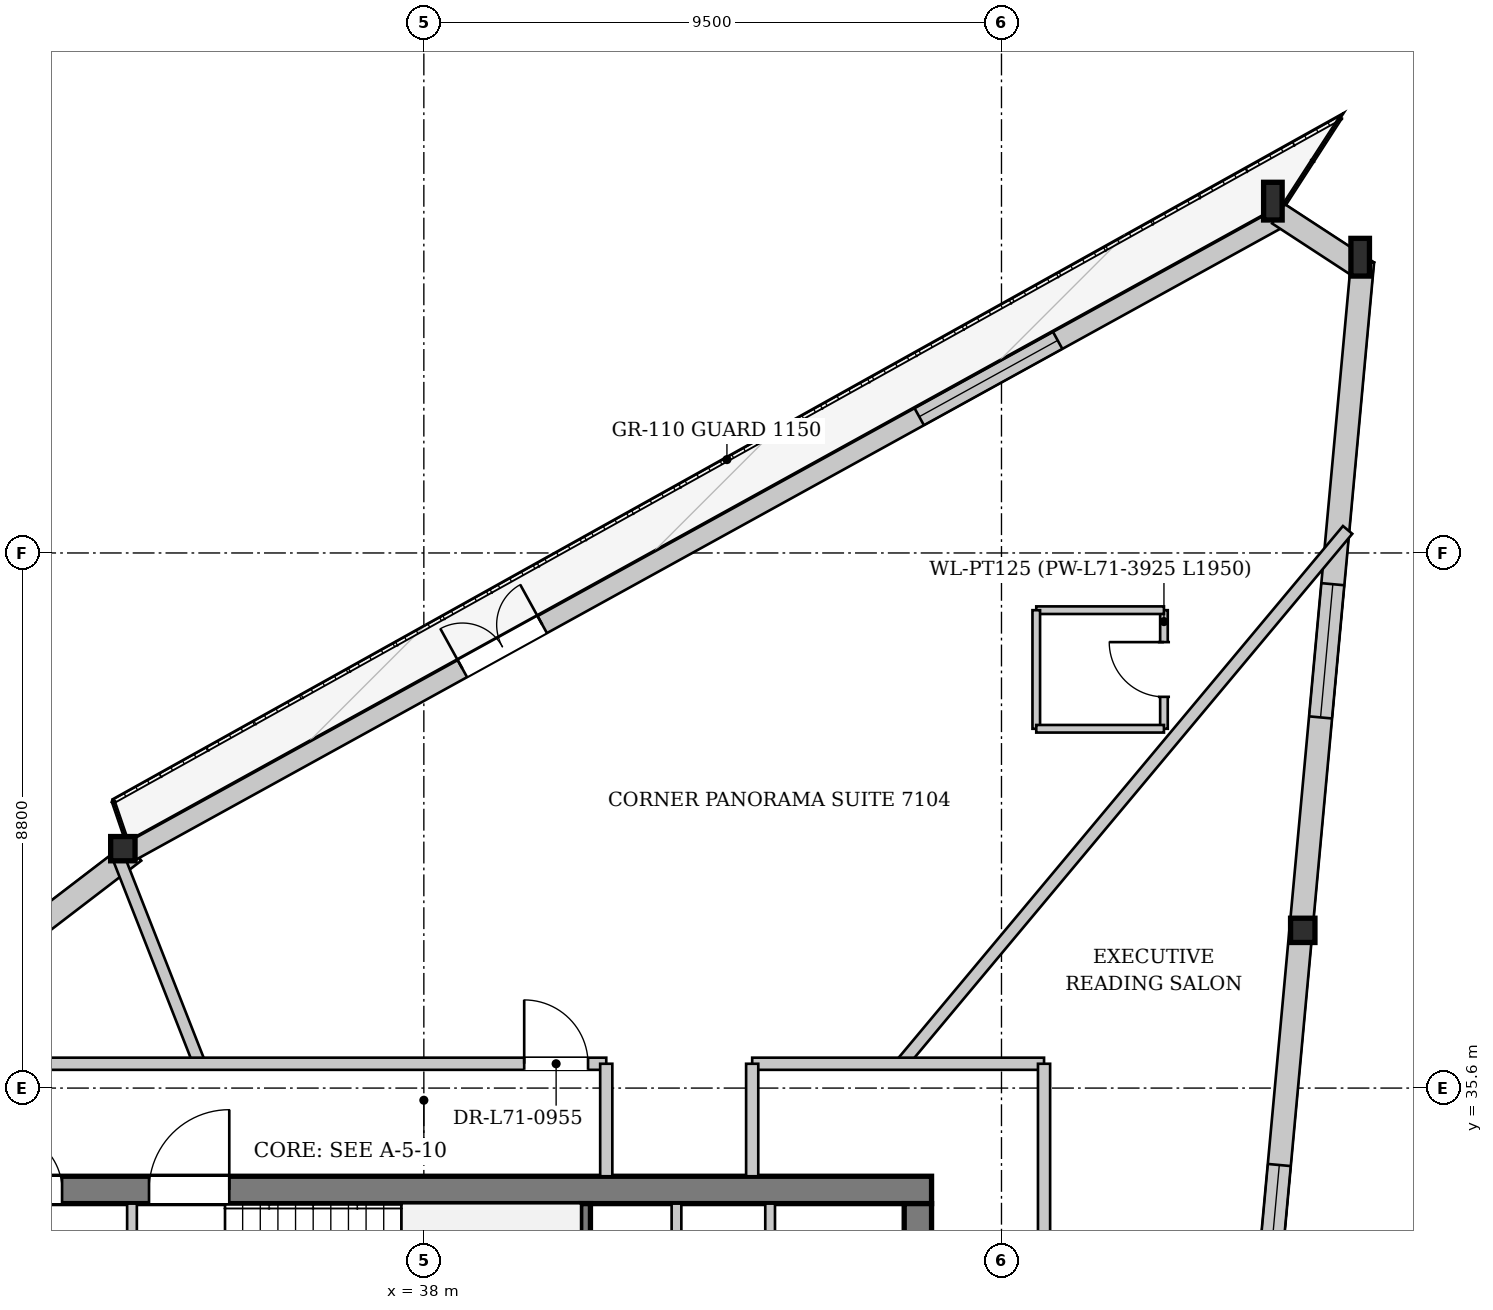
"""IFC4 building model, lengths in metres.
Left out: names, types, materials, properties, quantities, classifications, styles, units other than length and angle.
Written with IfcOpenShell. Run it as: python <this file> out.ifc"""

import sys

from ifc_helpers import new_model, si_unit, direction, frame, frame_2d, origin, origin_2d, place, context, subcontext, project, spatial, rectangle, i_section, extrude, source, transform, mapped, element, fill, save


model = new_model("IFC4")
c1 = context("Model", 3, precision=1e-05, world=origin(), true_north=direction((0.0, 1.0)))
c2 = subcontext(c1, "Body", "Model", "MODEL_VIEW")
j1 = project(units=[si_unit("LENGTHUNIT", "METRE"), si_unit("PLANEANGLEUNIT", "RADIAN")], contexts=[c1])
p1 = place(None, origin())
s1 = spatial("IfcSite", under=j1, at=p1, CompositionType="ELEMENT")
p2 = place(p1, origin())
s2 = spatial("IfcBuilding", under=s1, at=p2, CompositionType="ELEMENT")
p3 = place(p2, frame((0.0, 0.0, 266.9)))
s3 = spatial("IfcBuildingStorey", under=s2, at=p3, CompositionType="ELEMENT", Elevation=266.9)
m1 = source(origin(), c2, "Body", "SweptSolid", [
    extrude(i_section(OverallWidth=0.305, OverallDepth=0.62, WebThickness=0.021, FlangeThickness=0.04, at=origin_2d()), origin(), (0.0, 0.0, 1.0), 3.47),
])
p4 = place(p3, frame((53.628, 49.177, 0.0), z_axis=(-0.131930948894, 0.049746763129, 0.990009840498), x_axis=(-0.352818220088, -0.935691884957, 0.0)))
e1 = element("IfcColumn", 1, at=p4, inside=s3, PredefinedType="COLUMN", context=c2, shape_type="MappedRepresentation", body=[
    mapped(m1, transform((0.0, 0.0, 0.0), x_axis=(1.0, 0.0, 0.0), y_axis=(0.0, 1.0, 0.0), z_axis=(0.0, 0.0, 1.0), scale=1.0)),
])
m2 = source(origin(), c2, "Body", "SweptSolid", [
    extrude(i_section(OverallWidth=0.305, OverallDepth=0.62, WebThickness=0.021, FlangeThickness=0.04, at=origin_2d()), origin(), (0.0, 0.0, 1.0), 3.458),
])
p5 = place(p3, frame((52.158, 50.137, 0.0), z_axis=(-0.112596064897, 0.028025478222, 0.993245537992), x_axis=(-0.241533430749, -0.970392498853, 0.0)))
e2 = element("IfcColumn", 2, at=p5, inside=s3, PredefinedType="COLUMN", context=c2, shape_type="MappedRepresentation", body=[
    mapped(m2, transform((0.0, 0.0, 0.0), x_axis=(1.0, 0.0, 0.0), y_axis=(0.0, 1.0, 0.0), z_axis=(0.0, 0.0, 1.0), scale=1.0)),
])
m3 = source(origin(), c2, "Body", "SweptSolid", [
    extrude(i_section(OverallWidth=0.401, OverallDepth=0.399, WebThickness=0.022, FlangeThickness=0.034, at=origin_2d()), origin(), (0.0, 0.0, 1.0), 3.444),
])
p6 = place(p3, frame((33.122, 39.642, 0.0), z_axis=(-0.041819185738, -0.060673259308, 0.997281259881), x_axis=(0.823367771866, -0.567508160515, 0.0)))
e3 = element("IfcColumn", 3, at=p6, inside=s3, PredefinedType="COLUMN", context=c2, shape_type="MappedRepresentation", body=[
    mapped(m3, transform((0.0, 0.0, 0.0), x_axis=(1.0, 0.0, 0.0), y_axis=(0.0, 1.0, 0.0), z_axis=(0.0, 0.0, 1.0), scale=1.0)),
])
m4 = source(origin(), c2, "Body", "SweptSolid", [
    extrude(i_section(OverallWidth=0.401, OverallDepth=0.399, WebThickness=0.022, FlangeThickness=0.034, at=origin_2d()), origin(), (0.0, 0.0, 1.0), 3.454),
])
p7 = place(p3, frame((52.607, 38.097, 0.0), z_axis=(-0.087933725964, 0.055912843438, 0.994555887709), x_axis=(-0.536568207746, -0.843856953776, 0.0)))
e4 = element("IfcColumn", 4, at=p7, inside=s3, PredefinedType="COLUMN", context=c2, shape_type="MappedRepresentation", body=[
    mapped(m4, transform((0.0, 0.0, 0.0), x_axis=(1.0, 0.0, 0.0), y_axis=(0.0, 1.0, 0.0), z_axis=(0.0, 0.0, 1.0), scale=1.0)),
])
p8 = place(p3, frame((15.976, 26.276, 0.0), z_axis=(0.0, 0.0, 1.0), x_axis=(0.794029694054, 0.607878972297, 0.0)))
e5 = element("IfcWall", 5, at=p8, inside=s3, PredefinedType="SOLIDWALL", context=c2, shape_type="SweptSolid", body=[
    extrude(rectangle(XDim=21.739, YDim=0.38, at=frame_2d((10.869, 0.0))), origin(), (0.0, 0.0, 1.0), 2.872),
])
p9 = place(p8, frame((7.187, 0.0, 0.502)))
e6 = element("IfcOpeningElement", 6, at=p9, cuts=e5, PredefinedType="OPENING", context=c2, shape_type="SweptSolid", body=[
    extrude(rectangle(XDim=2.2, YDim=2.25, at=frame_2d((1.1, 1.125))), frame((0.0, 0.2, 0.0), z_axis=(0.0, -1.0, 0.0), x_axis=(1.0, 0.0, 0.0)), (0.0, 0.0, 1.0), 0.4),
])
p10 = place(p8, frame((16.752, 0.0, 0.502)))
e7 = element("IfcOpeningElement", 7, at=p10, cuts=e5, PredefinedType="OPENING", context=c2, shape_type="SweptSolid", body=[
    extrude(rectangle(XDim=2.2, YDim=2.25, at=frame_2d((1.1, 1.125))), frame((0.0, 0.2, 0.0), z_axis=(0.0, -1.0, 0.0), x_axis=(1.0, 0.0, 0.0)), (0.0, 0.0, 1.0), 0.4),
])
p11 = place(p3, frame((33.199, 39.501, 0.0), z_axis=(0.0, 0.0, 1.0), x_axis=(0.875716063216, 0.482826445658, 0.0)))
e8 = element("IfcWall", 8, at=p11, inside=s3, PredefinedType="SOLIDWALL", context=c2, shape_type="SweptSolid", body=[
    extrude(rectangle(XDim=21.738, YDim=0.32, at=frame_2d((10.869, 0.0))), origin(), (0.0, 0.0, 1.0), 2.872),
])
p12 = place(p11, frame((6.206, 0.0, 0.0)))
e9 = element("IfcOpeningElement", 9, at=p12, cuts=e8, PredefinedType="OPENING", context=c2, shape_type="SweptSolid", body=[
    extrude(rectangle(XDim=1.5, YDim=2.3, at=frame_2d((0.75, 1.15))), frame((0.0, 0.17, 0.0), z_axis=(0.0, -1.0, 0.0), x_axis=(1.0, 0.0, 0.0)), (0.0, 0.0, 1.0), 0.34),
])
p13 = place(p11, frame((14.786, 0.0, 0.402)))
e10 = element("IfcOpeningElement", 10, at=p13, cuts=e8, PredefinedType="OPENING", context=c2, shape_type="SweptSolid", body=[
    extrude(rectangle(XDim=2.6, YDim=2.35, at=frame_2d((1.3, 1.175))), frame((0.0, 0.17, 0.0), z_axis=(0.0, -1.0, 0.0), x_axis=(1.0, 0.0, 0.0)), (0.0, 0.0, 1.0), 0.34),
])
p14 = place(p3, frame((52.054, 49.979, 0.0), z_axis=(0.0, 0.0, 1.0), x_axis=(0.837253617298, -0.54681475869, 0.0)))
e11 = element("IfcWall", 11, at=p14, inside=s3, PredefinedType="SOLIDWALL", context=c2, shape_type="SweptSolid", body=[
    extrude(rectangle(XDim=1.756, YDim=0.38, at=frame_2d((0.878, 0.0))), origin(), (0.0, 0.0, 1.0), 2.872),
])
p15 = place(p3, frame((53.439, 49.195, 0.0), z_axis=(0.0, 0.0, 1.0), x_axis=(-0.091800782473, -0.995777392964, 0.0)))
e12 = element("IfcWall", 12, at=p15, inside=s3, PredefinedType="SOLIDWALL", context=c2, shape_type="SweptSolid", body=[
    extrude(rectangle(XDim=22.254, YDim=0.38, at=frame_2d((11.127, 0.0))), origin(), (0.0, 0.0, 1.0), 2.872),
])
p16 = place(p15, frame((5.331, 0.0, 0.502)))
e13 = element("IfcOpeningElement", 13, at=p16, cuts=e12, PredefinedType="OPENING", context=c2, shape_type="SweptSolid", body=[
    extrude(rectangle(XDim=2.2, YDim=2.25, at=frame_2d((1.1, 1.125))), frame((0.0, 0.2, 0.0), z_axis=(0.0, -1.0, 0.0), x_axis=(1.0, 0.0, 0.0)), (0.0, 0.0, 1.0), 0.4),
])
p17 = place(p15, frame((14.923, 0.0, 0.502)))
e14 = element("IfcOpeningElement", 14, at=p17, cuts=e12, PredefinedType="OPENING", context=c2, shape_type="SweptSolid", body=[
    extrude(rectangle(XDim=2.2, YDim=2.25, at=frame_2d((1.1, 1.125))), frame((0.0, 0.2, 0.0), z_axis=(0.0, -1.0, 0.0), x_axis=(1.0, 0.0, 0.0)), (0.0, 0.0, 1.0), 0.4),
])
p18 = place(p3, frame((29.65, 33.925, 0.0), z_axis=(0.0, 0.0, 1.0), x_axis=(1.0, 0.0, 0.0)))
e15 = element("IfcWall", 15, at=p18, inside=s3, PredefinedType="SHEAR", context=c2, shape_type="SweptSolid", body=[
    extrude(rectangle(XDim=16.7, YDim=0.45, at=frame_2d((8.35, 0.0))), origin(), (0.0, 0.0, 1.0), 3.38),
])
p19 = place(p18, frame((1.45, 0.0, 0.0)))
e16 = element("IfcOpeningElement", 16, at=p19, cuts=e15, PredefinedType="OPENING", context=c2, shape_type="SweptSolid", body=[
    extrude(rectangle(XDim=0.95, YDim=2.1, at=frame_2d((0.475, 1.05))), frame((0.0, 0.235, 0.0), z_axis=(0.0, -1.0, 0.0), x_axis=(1.0, 0.0, 0.0)), (0.0, 0.0, 1.0), 0.47),
])
p20 = place(p18, frame((3.83, 0.0, 0.0)))
e17 = element("IfcOpeningElement", 17, at=p20, cuts=e15, PredefinedType="OPENING", context=c2, shape_type="SweptSolid", body=[
    extrude(rectangle(XDim=1.32, YDim=2.2, at=frame_2d((0.66, 1.1))), frame((0.0, 0.235, 0.0), z_axis=(0.0, -1.0, 0.0), x_axis=(1.0, 0.0, 0.0)), (0.0, 0.0, 1.0), 0.47),
])
p21 = place(p3, frame((46.125, 33.7, 0.0), z_axis=(0.0, 0.0, 1.0), x_axis=(0.0, -1.0, 0.0)))
e18 = element("IfcWall", 18, at=p21, inside=s3, PredefinedType="SHEAR", context=c2, shape_type="SweptSolid", body=[
    extrude(rectangle(XDim=14.2, YDim=0.45, at=frame_2d((7.1, 0.0))), origin(), (0.0, 0.0, 1.0), 3.38),
])
p22 = place(p21, frame((5.18, 0.0, 0.0)))
e19 = element("IfcOpeningElement", 19, at=p22, cuts=e18, PredefinedType="OPENING", context=c2, shape_type="SweptSolid", body=[
    extrude(rectangle(XDim=1.6, YDim=2.2, at=frame_2d((0.8, 1.1))), frame((0.0, 0.235, 0.0), z_axis=(0.0, -1.0, 0.0), x_axis=(1.0, 0.0, 0.0)), (0.0, 0.0, 1.0), 0.47),
])
p23 = place(p21, frame((2.05, 0.0, 0.0)))
e20 = element("IfcOpeningElement", 20, at=p23, cuts=e18, PredefinedType="OPENING", context=c2, shape_type="SweptSolid", body=[
    extrude(rectangle(XDim=0.95, YDim=2.1, at=frame_2d((0.475, 1.05))), frame((0.0, 0.235, 0.0), z_axis=(0.0, -1.0, 0.0), x_axis=(1.0, 0.0, 0.0)), (0.0, 0.0, 1.0), 0.47),
])
p24 = place(p3, frame((40.66, 30.6, 0.0), z_axis=(0.0, 0.0, 1.0), x_axis=(0.0, 1.0, 0.0)))
e21 = element("IfcWall", 21, at=p24, inside=s3, PredefinedType="PARTITIONING", context=c2, shape_type="SweptSolid", body=[
    extrude(rectangle(XDim=3.1, YDim=0.16, at=frame_2d((1.55, 0.0))), origin(), (0.0, 0.0, 1.0), 3.38),
])
p25 = place(p3, frame((33.2, 28.44, 0.0), z_axis=(0.0, 0.0, 1.0), x_axis=(0.0, 1.0, 0.0)))
e22 = element("IfcWall", 22, at=p25, inside=s3, PredefinedType="PARTITIONING", context=c2, shape_type="SweptSolid", body=[
    extrude(rectangle(XDim=5.26, YDim=0.16, at=frame_2d((2.63, 0.0))), origin(), (0.0, 0.0, 1.0), 3.38),
])
p26 = place(p3, frame((42.155, 30.68, 0.0), z_axis=(0.0, 0.0, 1.0), x_axis=(0.0, 1.0, 0.0)))
e23 = element("IfcWall", 23, at=p26, inside=s3, PredefinedType="PARTITIONING", context=c2, shape_type="SweptSolid", body=[
    extrude(rectangle(XDim=3.02, YDim=0.16, at=frame_2d((1.51, 0.0))), origin(), (0.0, 0.0, 1.0), 3.38),
])
p27 = place(p26, frame((0.95, 0.0, 0.0)))
e24 = element("IfcOpeningElement", 24, at=p27, cuts=e23, PredefinedType="OPENING", context=c2, shape_type="SweptSolid", body=[
    extrude(rectangle(XDim=0.95, YDim=2.1, at=frame_2d((0.475, 1.05))), frame((0.0, 0.09, 0.0), z_axis=(0.0, -1.0, 0.0), x_axis=(1.0, 0.0, 0.0)), (0.0, 0.0, 1.0), 0.18),
])
p28 = place(p3, frame((43.695, 30.68, 0.0), z_axis=(0.0, 0.0, 1.0), x_axis=(0.0, 1.0, 0.0)))
e25 = element("IfcWall", 25, at=p28, inside=s3, PredefinedType="PARTITIONING", context=c2, shape_type="SweptSolid", body=[
    extrude(rectangle(XDim=3.02, YDim=0.16, at=frame_2d((1.51, 0.0))), origin(), (0.0, 0.0, 1.0), 3.38),
])
p29 = place(p28, frame((0.95, 0.0, 0.0)))
e26 = element("IfcOpeningElement", 26, at=p29, cuts=e25, PredefinedType="OPENING", context=c2, shape_type="SweptSolid", body=[
    extrude(rectangle(XDim=0.95, YDim=2.1, at=frame_2d((0.475, 1.05))), frame((0.0, 0.09, 0.0), z_axis=(0.0, -1.0, 0.0), x_axis=(1.0, 0.0, 0.0)), (0.0, 0.0, 1.0), 0.18),
])
p30 = place(p3, frame((45.856, 36.0, 0.0), z_axis=(0.0, 0.0, 1.0), x_axis=(0.641258383764, 0.767325019305, 0.0)))
e27 = element("IfcWall", 27, at=p30, inside=s3, PredefinedType="PARTITIONING", context=c2, shape_type="SweptSolid", body=[
    extrude(rectangle(XDim=11.441, YDim=0.2, at=frame_2d((5.721, 0.0))), origin(), (0.0, 0.0, 1.0), 3.38),
])
p31 = place(p3, frame((34.31, 36.0, 0.0), z_axis=(0.0, 0.0, 1.0), x_axis=(-0.365399106967, 0.930850950812, 0.0)))
e28 = element("IfcWall", 28, at=p31, inside=s3, PredefinedType="PARTITIONING", context=c2, shape_type="SweptSolid", body=[
    extrude(rectangle(XDim=3.728, YDim=0.2, at=frame_2d((1.864, 0.0))), origin(), (0.0, 0.0, 1.0), 2.915),
])
p32 = place(p3, frame((50.172, 41.509, 0.0), z_axis=(0.0, 0.0, 1.0), x_axis=(0.0, 1.0, 0.0)))
e29 = element("IfcWall", 29, at=p32, inside=s3, PredefinedType="PARTITIONING", context=c2, shape_type="SweptSolid", body=[
    extrude(rectangle(XDim=1.95, YDim=0.125, at=frame_2d((0.975, 0.0))), origin(), (0.0, 0.0, 1.0), 3.38),
])
p33 = place(p32, frame((0.525, 0.0, 0.0)))
e30 = element("IfcOpeningElement", 30, at=p33, cuts=e29, PredefinedType="OPENING", context=c2, shape_type="SweptSolid", body=[
    extrude(rectangle(XDim=0.9, YDim=2.1, at=frame_2d((0.45, 1.05))), frame((0.0, 0.073, 0.0), z_axis=(0.0, -1.0, 0.0), x_axis=(1.0, 0.0, 0.0)), (0.0, 0.0, 1.0), 0.145),
])
p34 = place(p3, frame((50.172, 43.459, 0.0), z_axis=(0.0, 0.0, 1.0), x_axis=(-1.0, 0.0, 0.0)))
e31 = element("IfcWall", 31, at=p34, inside=s3, PredefinedType="PARTITIONING", context=c2, shape_type="SweptSolid", body=[
    extrude(rectangle(XDim=2.1, YDim=0.125, at=frame_2d((1.05, 0.0))), origin(), (0.0, 0.0, 1.0), 3.38),
])
p35 = place(p3, frame((48.072, 43.459, 0.0), z_axis=(0.0, 0.0, 1.0), x_axis=(0.0, -1.0, 0.0)))
e32 = element("IfcWall", 32, at=p35, inside=s3, PredefinedType="PARTITIONING", context=c2, shape_type="SweptSolid", body=[
    extrude(rectangle(XDim=1.95, YDim=0.125, at=frame_2d((0.975, 0.0))), origin(), (0.0, 0.0, 1.0), 3.055),
])
p36 = place(p3, frame((48.072, 41.509, 0.0), z_axis=(0.0, 0.0, 1.0), x_axis=(1.0, 0.0, 0.0)))
e33 = element("IfcWall", 33, at=p36, inside=s3, PredefinedType="PARTITIONING", context=c2, shape_type="SweptSolid", body=[
    extrude(rectangle(XDim=2.1, YDim=0.125, at=frame_2d((1.05, 0.0))), origin(), (0.0, 0.0, 1.0), 3.38),
])
p37 = place(p3, frame((28.414, 36.0, 0.0), z_axis=(0.0, 0.0, 1.0), x_axis=(1.0, 0.0, 0.0)))
e34 = element("IfcWall", 34, at=p37, inside=s3, PredefinedType="PARTITIONING", context=c2, shape_type="SweptSolid", body=[
    extrude(rectangle(XDim=12.586, YDim=0.2, at=frame_2d((6.293, 0.0))), origin(), (0.0, 0.0, 1.0), 3.38),
])
p38 = place(p37, frame((11.236, 0.0, 0.0)))
e35 = element("IfcOpeningElement", 35, at=p38, cuts=e34, PredefinedType="OPENING", context=c2, shape_type="SweptSolid", body=[
    extrude(rectangle(XDim=1.05, YDim=2.2, at=frame_2d((0.525, 1.1))), frame((0.0, 0.11, 0.0), z_axis=(0.0, -1.0, 0.0), x_axis=(1.0, 0.0, 0.0)), (0.0, 0.0, 1.0), 0.22),
])
p39 = place(p3, frame((41.0, 34.15, 0.0), z_axis=(0.0, 0.0, 1.0), x_axis=(0.0, 1.0, 0.0)))
e36 = element("IfcWall", 36, at=p39, inside=s3, PredefinedType="PARTITIONING", context=c2, shape_type="SweptSolid", body=[
    extrude(rectangle(XDim=1.85, YDim=0.2, at=frame_2d((0.925, 0.0))), origin(), (0.0, 0.0, 1.0), 3.38),
])
p40 = place(p3, frame((43.4, 36.0, 0.0), z_axis=(0.0, 0.0, 1.0), x_axis=(1.0, 0.0, 0.0)))
e37 = element("IfcWall", 37, at=p40, inside=s3, PredefinedType="PARTITIONING", context=c2, shape_type="SweptSolid", body=[
    extrude(rectangle(XDim=4.8, YDim=0.2, at=frame_2d((2.4, 0.0))), origin(), (0.0, 0.0, 1.0), 3.38),
])
p41 = place(p3, frame((43.4, 34.15, 0.0), z_axis=(0.0, 0.0, 1.0), x_axis=(0.0, 1.0, 0.0)))
e38 = element("IfcWall", 38, at=p41, inside=s3, PredefinedType="PARTITIONING", context=c2, shape_type="SweptSolid", body=[
    extrude(rectangle(XDim=1.85, YDim=0.2, at=frame_2d((0.925, 0.0))), origin(), (0.0, 0.0, 1.0), 3.055),
])
p42 = place(p3, frame((48.2, 17.2, 0.0), z_axis=(0.0, 0.0, 1.0), x_axis=(0.0, 1.0, 0.0)))
e39 = element("IfcWall", 39, at=p42, inside=s3, PredefinedType="PARTITIONING", context=c2, shape_type="SweptSolid", body=[
    extrude(rectangle(XDim=18.8, YDim=0.2, at=frame_2d((9.4, 0.0))), origin(), (0.0, 0.0, 1.0), 3.065),
])
p43 = place(p42, frame((0.3, 0.0, 0.0)))
e40 = element("IfcOpeningElement", 40, at=p43, cuts=e39, PredefinedType="OPENING", context=c2, shape_type="SweptSolid", body=[
    extrude(rectangle(XDim=1.05, YDim=2.2, at=frame_2d((0.525, 1.1))), frame((0.0, 0.11, 0.0), z_axis=(0.0, -1.0, 0.0), x_axis=(1.0, 0.0, 0.0)), (0.0, 0.0, 1.0), 0.22),
])
p44 = place(p42, frame((13.811, 0.0, 0.0)))
e41 = element("IfcOpeningElement", 41, at=p44, cuts=e39, PredefinedType="OPENING", context=c2, shape_type="SweptSolid", body=[
    extrude(rectangle(XDim=1.05, YDim=2.2, at=frame_2d((0.525, 1.1))), frame((0.0, 0.11, 0.0), z_axis=(0.0, -1.0, 0.0), x_axis=(1.0, 0.0, 0.0)), (0.0, 0.0, 1.0), 0.22),
])
m5 = source(origin(), c2, "Body", "SweptSolid", [
    extrude(rectangle(XDim=1.5, YDim=2.3, at=frame_2d((0.75, 1.15))), frame((0.0, 0.025, 0.0), z_axis=(0.0, -1.0, 0.0), x_axis=(1.0, 0.0, 0.0)), (0.0, 0.0, 1.0), 0.05),
])
p45 = place(p12, origin())
e42 = element("IfcDoor", 42, at=p45, inside=s3, OperationType="DOUBLE_DOOR_SINGLE_SWING", PredefinedType="DOOR", context=c2, shape_type="MappedRepresentation", body=[
    mapped(m5, transform((0.0, 0.0, 0.0), x_axis=(1.0, 0.0, 0.0), y_axis=(0.0, 1.0, 0.0), z_axis=(0.0, 0.0, 1.0), scale=1.0)),
])
fill(e9, e42)
m6 = source(origin(), c2, "Body", "SweptSolid", [
    extrude(rectangle(XDim=2.6, YDim=2.35, at=frame_2d((1.3, 1.175))), frame((0.0, 0.03, 0.0), z_axis=(0.0, -1.0, 0.0), x_axis=(1.0, 0.0, 0.0)), (0.0, 0.0, 1.0), 0.06),
])
p46 = place(p13, origin())
e43 = element("IfcWindow", 43, at=p46, inside=s3, PartitioningType="SINGLE_PANEL", PredefinedType="WINDOW", context=c2, shape_type="MappedRepresentation", body=[
    mapped(m6, transform((0.0, 0.0, 0.0), x_axis=(1.0, 0.0, 0.0), y_axis=(0.0, 1.0, 0.0), z_axis=(0.0, 0.0, 1.0), scale=1.0)),
])
fill(e10, e43)
m7 = source(origin(), c2, "Body", "SweptSolid", [
    extrude(rectangle(XDim=2.2, YDim=2.25, at=frame_2d((1.1, 1.125))), frame((0.0, 0.03, 0.0), z_axis=(0.0, -1.0, 0.0), x_axis=(1.0, 0.0, 0.0)), (0.0, 0.0, 1.0), 0.06),
])
p47 = place(p16, origin())
e44 = element("IfcWindow", 44, at=p47, inside=s3, PartitioningType="SINGLE_PANEL", PredefinedType="WINDOW", context=c2, shape_type="MappedRepresentation", body=[
    mapped(m7, transform((0.0, 0.0, 0.0), x_axis=(1.0, 0.0, 0.0), y_axis=(0.0, 1.0, 0.0), z_axis=(0.0, 0.0, 1.0), scale=1.0)),
])
fill(e13, e44)
p48 = place(p17, origin())
e45 = element("IfcWindow", 45, at=p48, inside=s3, PartitioningType="SINGLE_PANEL", PredefinedType="WINDOW", context=c2, shape_type="MappedRepresentation", body=[
    mapped(m7, transform((0.0, 0.0, 0.0), x_axis=(1.0, 0.0, 0.0), y_axis=(0.0, 1.0, 0.0), z_axis=(0.0, 0.0, 1.0), scale=1.0)),
])
fill(e14, e45)
m8 = source(origin(), c2, "Body", "SweptSolid", [
    extrude(rectangle(XDim=0.95, YDim=2.1, at=frame_2d((0.475, 1.05))), frame((0.0, 0.025, 0.0), z_axis=(0.0, -1.0, 0.0), x_axis=(1.0, 0.0, 0.0)), (0.0, 0.0, 1.0), 0.05),
])
p49 = place(p19, origin())
e46 = element("IfcDoor", 46, at=p49, inside=s3, OperationType="SINGLE_SWING_LEFT", PredefinedType="DOOR", context=c2, shape_type="MappedRepresentation", body=[
    mapped(m8, transform((0.0, 0.0, 0.0), x_axis=(1.0, 0.0, 0.0), y_axis=(0.0, 1.0, 0.0), z_axis=(0.0, 0.0, 1.0), scale=1.0)),
])
fill(e16, e46)
m9 = source(origin(), c2, "Body", "SweptSolid", [
    extrude(rectangle(XDim=1.32, YDim=2.2, at=frame_2d((0.66, 1.1))), frame((0.0, 0.025, 0.0), z_axis=(0.0, -1.0, 0.0), x_axis=(1.0, 0.0, 0.0)), (0.0, 0.0, 1.0), 0.05),
])
p50 = place(p20, origin())
e47 = element("IfcDoor", 47, at=p50, inside=s3, OperationType="SINGLE_SWING_RIGHT", PredefinedType="DOOR", context=c2, shape_type="MappedRepresentation", body=[
    mapped(m9, transform((0.0, 0.0, 0.0), x_axis=(1.0, 0.0, 0.0), y_axis=(0.0, 1.0, 0.0), z_axis=(0.0, 0.0, 1.0), scale=1.0)),
])
fill(e17, e47)
m10 = source(origin(), c2, "Body", "SweptSolid", [
    extrude(rectangle(XDim=0.9, YDim=2.1, at=frame_2d((0.45, 1.05))), frame((0.0, 0.025, 0.0), z_axis=(0.0, -1.0, 0.0), x_axis=(1.0, 0.0, 0.0)), (0.0, 0.0, 1.0), 0.05),
])
p51 = place(p33, origin())
e48 = element("IfcDoor", 48, at=p51, inside=s3, OperationType="SINGLE_SWING_RIGHT", PredefinedType="DOOR", context=c2, shape_type="MappedRepresentation", body=[
    mapped(m10, transform((0.0, 0.0, 0.0), x_axis=(1.0, 0.0, 0.0), y_axis=(0.0, 1.0, 0.0), z_axis=(0.0, 0.0, 1.0), scale=1.0)),
])
fill(e30, e48)
m11 = source(origin(), c2, "Body", "SweptSolid", [
    extrude(rectangle(XDim=1.05, YDim=2.2, at=frame_2d((0.525, 1.1))), frame((0.0, 0.025, 0.0), z_axis=(0.0, -1.0, 0.0), x_axis=(1.0, 0.0, 0.0)), (0.0, 0.0, 1.0), 0.05),
])
p52 = place(p38, origin())
e49 = element("IfcDoor", 49, at=p52, inside=s3, OperationType="SINGLE_SWING_LEFT", PredefinedType="DOOR", context=c2, shape_type="MappedRepresentation", body=[
    mapped(m11, transform((0.0, 0.0, 0.0), x_axis=(1.0, 0.0, 0.0), y_axis=(0.0, 1.0, 0.0), z_axis=(0.0, 0.0, 1.0), scale=1.0)),
])
fill(e35, e49)
save(model, sys.argv[1])
